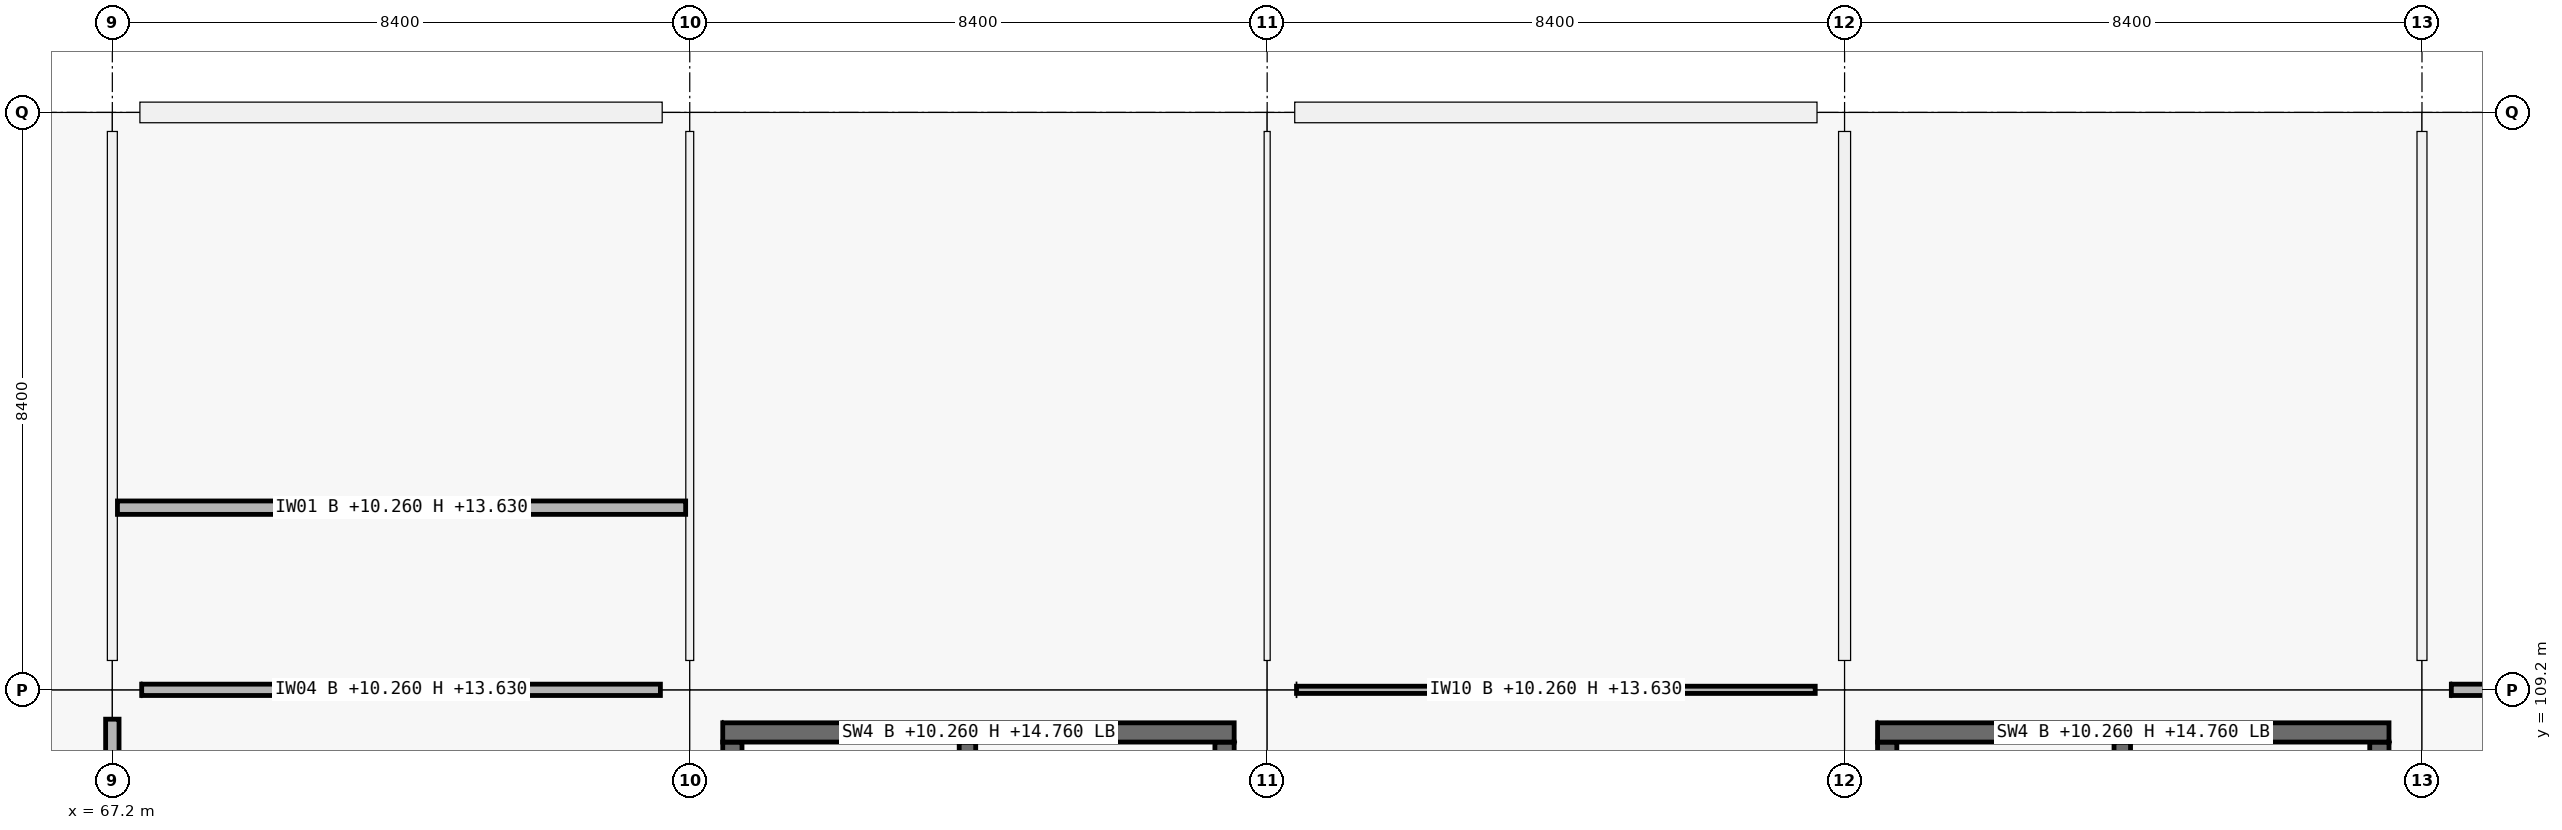
"""IFC4 building model, lengths in metres.
Left out: names, types, materials, properties, quantities, classifications, styles, units other than length and angle.
Written with IfcOpenShell. Run it as: python <this file> out.ifc"""

import sys

from ifc_helpers import new_model, si_unit, direction, frame, frame_2d, origin, origin_2d, place, context, subcontext, project, spatial, rectangle, extrude, element, fill, save


model = new_model("IFC4")
c1 = context("Model", 3, precision=1e-05, world=origin(), true_north=direction((0.0, 1.0)))
c2 = subcontext(c1, "Body", "Model", "MODEL_VIEW")
j1 = project(units=[si_unit("LENGTHUNIT", "METRE"), si_unit("PLANEANGLEUNIT", "RADIAN")], contexts=[c1])
p1 = place(None, origin())
s1 = spatial("IfcSite", under=j1, at=p1, CompositionType="ELEMENT")
p2 = place(p1, origin())
s2 = spatial("IfcBuilding", under=s1, at=p2, CompositionType="ELEMENT")
p3 = place(p2, frame((0.0, 0.0, 10.26)))
s3 = spatial("IfcBuildingStorey", under=s2, at=p3, CompositionType="ELEMENT", Elevation=10.26)
p4 = place(p3, frame((67.2, 109.2, 0.0), z_axis=(0.0, 0.0, 1.0), x_axis=(1.0, 0.0, 0.0)))
e1 = element("IfcColumn", 1, at=p4, inside=s3, PredefinedType="COLUMN", context=c2, shape_type="SweptSolid", body=[
    extrude(rectangle(XDim=0.85, YDim=0.85, at=origin_2d()), origin(), (0.0, 0.0, 1.0), 4.5),
])
p5 = place(p3, frame((67.2, 117.6, 0.0), z_axis=(0.0, 0.0, 1.0), x_axis=(1.0, 0.0, 0.0)))
e2 = element("IfcColumn", 2, at=p5, inside=s3, PredefinedType="COLUMN", context=c2, shape_type="SweptSolid", body=[
    extrude(rectangle(XDim=0.8, YDim=0.55, at=origin_2d()), origin(), (0.0, 0.0, 1.0), 4.5),
])
p6 = place(p3, frame((75.6, 109.2, 0.0), z_axis=(0.0, 0.0, 1.0), x_axis=(1.0, 0.0, 0.0)))
e3 = element("IfcColumn", 3, at=p6, inside=s3, PredefinedType="COLUMN", context=c2, shape_type="SweptSolid", body=[
    extrude(rectangle(XDim=0.85, YDim=0.85, at=origin_2d()), origin(), (0.0, 0.0, 1.0), 4.5),
])
p7 = place(p3, frame((75.6, 117.6, 0.0), z_axis=(0.0, 0.0, 1.0), x_axis=(1.0, 0.0, 0.0)))
e4 = element("IfcColumn", 4, at=p7, inside=s3, PredefinedType="COLUMN", context=c2, shape_type="SweptSolid", body=[
    extrude(rectangle(XDim=0.8, YDim=0.55, at=origin_2d()), origin(), (0.0, 0.0, 1.0), 4.5),
])
p8 = place(p3, frame((84.0, 109.2, 0.0), z_axis=(0.0, 0.0, 1.0), x_axis=(1.0, 0.0, 0.0)))
e5 = element("IfcColumn", 5, at=p8, inside=s3, PredefinedType="COLUMN", context=c2, shape_type="SweptSolid", body=[
    extrude(rectangle(XDim=0.85, YDim=0.85, at=origin_2d()), origin(), (0.0, 0.0, 1.0), 4.5),
])
p9 = place(p3, frame((84.0, 117.6, 0.0), z_axis=(0.0, 0.0, 1.0), x_axis=(1.0, 0.0, 0.0)))
e6 = element("IfcColumn", 6, at=p9, inside=s3, PredefinedType="COLUMN", context=c2, shape_type="SweptSolid", body=[
    extrude(rectangle(XDim=0.8, YDim=0.55, at=origin_2d()), origin(), (0.0, 0.0, 1.0), 4.5),
])
p10 = place(p3, frame((92.4, 109.2, 0.0), z_axis=(0.0, 0.0, 1.0), x_axis=(1.0, 0.0, 0.0)))
e7 = element("IfcColumn", 7, at=p10, inside=s3, PredefinedType="COLUMN", context=c2, shape_type="SweptSolid", body=[
    extrude(rectangle(XDim=0.85, YDim=0.85, at=origin_2d()), origin(), (0.0, 0.0, 1.0), 4.5),
])
p11 = place(p3, frame((92.4, 117.6, 0.0), z_axis=(0.0, 0.0, 1.0), x_axis=(1.0, 0.0, 0.0)))
e8 = element("IfcColumn", 8, at=p11, inside=s3, PredefinedType="COLUMN", context=c2, shape_type="SweptSolid", body=[
    extrude(rectangle(XDim=0.8, YDim=0.55, at=origin_2d()), origin(), (0.0, 0.0, 1.0), 4.5),
])
p12 = place(p3, frame((100.8, 109.2, 0.0), z_axis=(0.0, 0.0, 1.0), x_axis=(1.0, 0.0, 0.0)))
e9 = element("IfcColumn", 9, at=p12, inside=s3, PredefinedType="COLUMN", context=c2, shape_type="SweptSolid", body=[
    extrude(rectangle(XDim=0.85, YDim=0.85, at=origin_2d()), origin(), (0.0, 0.0, 1.0), 4.5),
])
p13 = place(p3, frame((100.8, 117.6, 0.0), z_axis=(0.0, 0.0, 1.0), x_axis=(1.0, 0.0, 0.0)))
e10 = element("IfcColumn", 10, at=p13, inside=s3, PredefinedType="COLUMN", context=c2, shape_type="SweptSolid", body=[
    extrude(rectangle(XDim=0.8, YDim=0.55, at=origin_2d()), origin(), (0.0, 0.0, 1.0), 4.5),
])
p14 = place(p3, frame((67.601, 117.6, 0.0), z_axis=(0.0, 0.0, 1.0), x_axis=(1.0, 0.0, 0.0)))
e11 = element("IfcWall", 11, at=p14, inside=s3, PredefinedType="SOLIDWALL", context=c2, shape_type="SweptSolid", body=[
    extrude(rectangle(XDim=7.598, YDim=0.3, at=frame_2d((3.799, 0.0))), origin(), (0.0, 0.0, 1.0), 3.54),
])
p15 = place(p14, frame((3.124, 0.0, 0.9)))
e12 = element("IfcOpeningElement", 12, at=p15, cuts=e11, PredefinedType="OPENING", context=c2, shape_type="SweptSolid", body=[
    extrude(rectangle(XDim=1.35, YDim=1.5, at=frame_2d((0.675, 0.75))), frame((0.0, 0.15, 0.0), z_axis=(0.0, -1.0, 0.0), x_axis=(1.0, 0.0, 0.0)), (0.0, 0.0, 1.0), 0.3),
])
p16 = place(p3, frame((84.401, 117.6, 0.0), z_axis=(0.0, 0.0, 1.0), x_axis=(1.0, 0.0, 0.0)))
e13 = element("IfcWall", 13, at=p16, inside=s3, PredefinedType="SOLIDWALL", context=c2, shape_type="SweptSolid", body=[
    extrude(rectangle(XDim=7.598, YDim=0.3, at=frame_2d((3.799, 0.0))), origin(), (0.0, 0.0, 1.0), 3.54),
])
p17 = place(p16, frame((2.949, 0.0, 0.9)))
e14 = element("IfcOpeningElement", 14, at=p17, cuts=e13, PredefinedType="OPENING", context=c2, shape_type="SweptSolid", body=[
    extrude(rectangle(XDim=1.7, YDim=1.85, at=frame_2d((0.85, 0.925))), frame((0.0, 0.15, 0.0), z_axis=(0.0, -1.0, 0.0), x_axis=(1.0, 0.0, 0.0)), (0.0, 0.0, 1.0), 0.3),
])
p18 = place(p3, frame((76.22, 101.56, 0.0), z_axis=(0.0, 0.0, 1.0), x_axis=(0.0, 1.0, 0.0)))
e15 = element("IfcWall", 15, at=p18, inside=s3, PredefinedType="SHEAR", context=c2, shape_type="SweptSolid", body=[
    extrude(rectangle(XDim=6.88, YDim=0.28, at=frame_2d((3.44, 0.0))), origin(), (0.0, 0.0, 1.0), 4.5),
])
p19 = place(p3, frame((76.08, 108.58, 0.0), z_axis=(0.0, 0.0, 1.0), x_axis=(1.0, 0.0, 0.0)))
e16 = element("IfcWall", 16, at=p19, inside=s3, PredefinedType="SHEAR", context=c2, shape_type="SweptSolid", body=[
    extrude(rectangle(XDim=7.44, YDim=0.28, at=frame_2d((3.72, 0.0))), origin(), (0.0, 0.0, 1.0), 4.5),
])
p20 = place(p3, frame((83.38, 108.44, 0.0), z_axis=(0.0, 0.0, 1.0), x_axis=(0.0, -1.0, 0.0)))
e17 = element("IfcWall", 17, at=p20, inside=s3, PredefinedType="SHEAR", context=c2, shape_type="SweptSolid", body=[
    extrude(rectangle(XDim=6.88, YDim=0.28, at=frame_2d((3.44, 0.0))), origin(), (0.0, 0.0, 1.0), 4.5),
])
p21 = place(p20, frame((3.99, 0.0, 0.0)))
e18 = element("IfcOpeningElement", 18, at=p21, cuts=e17, PredefinedType="OPENING", context=c2, shape_type="SweptSolid", body=[
    extrude(rectangle(XDim=1.5, YDim=2.15, at=frame_2d((0.75, 1.075))), frame((0.0, 0.14, 0.0), z_axis=(0.0, -1.0, 0.0), x_axis=(1.0, 0.0, 0.0)), (0.0, 0.0, 1.0), 0.28),
])
p22 = place(p3, frame((79.64, 101.56, 0.0), z_axis=(0.0, 0.0, 1.0), x_axis=(0.0, 1.0, 0.0)))
e19 = element("IfcWall", 19, at=p22, inside=s3, PredefinedType="SHEAR", context=c2, shape_type="SweptSolid", body=[
    extrude(rectangle(XDim=6.88, YDim=0.24, at=frame_2d((3.44, 0.0))), origin(), (0.0, 0.0, 1.0), 4.5),
])
p23 = place(p22, frame((0.12, 0.0, 0.0)))
e20 = element("IfcOpeningElement", 20, at=p23, cuts=e19, PredefinedType="OPENING", context=c2, shape_type="SweptSolid", body=[
    extrude(rectangle(XDim=1.0, YDim=2.15, at=frame_2d((0.5, 1.075))), frame((0.0, 0.12, 0.0), z_axis=(0.0, -1.0, 0.0), x_axis=(1.0, 0.0, 0.0)), (0.0, 0.0, 1.0), 0.24),
])
p24 = place(p3, frame((93.02, 101.56, 0.0), z_axis=(0.0, 0.0, 1.0), x_axis=(0.0, 1.0, 0.0)))
e21 = element("IfcWall", 21, at=p24, inside=s3, PredefinedType="SHEAR", context=c2, shape_type="SweptSolid", body=[
    extrude(rectangle(XDim=6.88, YDim=0.28, at=frame_2d((3.44, 0.0))), origin(), (0.0, 0.0, 1.0), 4.5),
])
p25 = place(p3, frame((92.88, 108.58, 0.0), z_axis=(0.0, 0.0, 1.0), x_axis=(1.0, 0.0, 0.0)))
e22 = element("IfcWall", 22, at=p25, inside=s3, PredefinedType="SHEAR", context=c2, shape_type="SweptSolid", body=[
    extrude(rectangle(XDim=7.44, YDim=0.28, at=frame_2d((3.72, 0.0))), origin(), (0.0, 0.0, 1.0), 4.5),
])
p26 = place(p3, frame((100.18, 108.44, 0.0), z_axis=(0.0, 0.0, 1.0), x_axis=(0.0, -1.0, 0.0)))
e23 = element("IfcWall", 23, at=p26, inside=s3, PredefinedType="SHEAR", context=c2, shape_type="SweptSolid", body=[
    extrude(rectangle(XDim=6.88, YDim=0.28, at=frame_2d((3.44, 0.0))), origin(), (0.0, 0.0, 1.0), 4.5),
])
p27 = place(p26, frame((3.99, 0.0, 0.0)))
e24 = element("IfcOpeningElement", 24, at=p27, cuts=e23, PredefinedType="OPENING", context=c2, shape_type="SweptSolid", body=[
    extrude(rectangle(XDim=1.5, YDim=2.15, at=frame_2d((0.75, 1.075))), frame((0.0, 0.14, 0.0), z_axis=(0.0, -1.0, 0.0), x_axis=(1.0, 0.0, 0.0)), (0.0, 0.0, 1.0), 0.28),
])
p28 = place(p3, frame((96.44, 101.56, 0.0), z_axis=(0.0, 0.0, 1.0), x_axis=(0.0, 1.0, 0.0)))
e25 = element("IfcWall", 25, at=p28, inside=s3, PredefinedType="SHEAR", context=c2, shape_type="SweptSolid", body=[
    extrude(rectangle(XDim=6.88, YDim=0.24, at=frame_2d((3.44, 0.0))), origin(), (0.0, 0.0, 1.0), 4.5),
])
p29 = place(p28, frame((0.12, 0.0, 0.0)))
e26 = element("IfcOpeningElement", 26, at=p29, cuts=e25, PredefinedType="OPENING", context=c2, shape_type="SweptSolid", body=[
    extrude(rectangle(XDim=1.0, YDim=2.15, at=frame_2d((0.5, 1.075))), frame((0.0, 0.12, 0.0), z_axis=(0.0, -1.0, 0.0), x_axis=(1.0, 0.0, 0.0)), (0.0, 0.0, 1.0), 0.24),
])
p30 = place(p3, frame((67.627, 109.2, 0.0), z_axis=(0.0, 0.0, 1.0), x_axis=(1.0, 0.0, 0.0)))
e27 = element("IfcWall", 27, at=p30, inside=s3, PredefinedType="PARTITIONING", context=c2, shape_type="SweptSolid", body=[
    extrude(rectangle(XDim=7.546, YDim=0.165, at=frame_2d((3.773, 0.0))), origin(), (0.0, 0.0, 1.0), 3.37),
])
p31 = place(p3, frame((84.427, 109.2, 0.0), z_axis=(0.0, 0.0, 1.0), x_axis=(1.0, 0.0, 0.0)))
e28 = element("IfcWall", 28, at=p31, inside=s3, PredefinedType="PARTITIONING", context=c2, shape_type="SweptSolid", body=[
    extrude(rectangle(XDim=7.546, YDim=0.105, at=frame_2d((3.773, 0.0))), origin(), (0.0, 0.0, 1.0), 3.37),
])
p32 = place(p31, frame((3.288, 0.0, 0.0)))
e29 = element("IfcOpeningElement", 29, at=p32, cuts=e28, PredefinedType="OPENING", context=c2, shape_type="SweptSolid", body=[
    extrude(rectangle(XDim=0.97, YDim=2.12, at=frame_2d((0.485, 1.06))), frame((0.0, 0.052, 0.0), z_axis=(0.0, -1.0, 0.0), x_axis=(1.0, 0.0, 0.0)), (0.0, 0.0, 1.0), 0.105),
])
p33 = place(p3, frame((101.227, 109.2, 0.0), z_axis=(0.0, 0.0, 1.0), x_axis=(1.0, 0.0, 0.0)))
e30 = element("IfcWall", 30, at=p33, inside=s3, PredefinedType="PARTITIONING", context=c2, shape_type="SweptSolid", body=[
    extrude(rectangle(XDim=7.546, YDim=0.165, at=frame_2d((3.773, 0.0))), origin(), (0.0, 0.0, 1.0), 3.37),
])
p34 = place(p33, frame((3.273, 0.0, 0.0)))
e31 = element("IfcOpeningElement", 31, at=p34, cuts=e30, PredefinedType="OPENING", context=c2, shape_type="SweptSolid", body=[
    extrude(rectangle(XDim=1.0, YDim=2.2, at=frame_2d((0.5, 1.1))), frame((0.0, 0.083, 0.0), z_axis=(0.0, -1.0, 0.0), x_axis=(1.0, 0.0, 0.0)), (0.0, 0.0, 1.0), 0.165),
])
p35 = place(p3, frame((67.2, 101.227, 0.0), z_axis=(0.0, 0.0, 1.0), x_axis=(0.0, 1.0, 0.0)))
e32 = element("IfcWall", 32, at=p35, inside=s3, PredefinedType="PARTITIONING", context=c2, shape_type="SweptSolid", body=[
    extrude(rectangle(XDim=7.546, YDim=0.195, at=frame_2d((3.773, 0.0))), origin(), (0.0, 0.0, 1.0), 3.37),
])
p36 = place(p35, frame((3.273, 0.0, 0.0)))
e33 = element("IfcOpeningElement", 33, at=p36, cuts=e32, PredefinedType="OPENING", context=c2, shape_type="SweptSolid", body=[
    extrude(rectangle(XDim=1.0, YDim=2.2, at=frame_2d((0.5, 1.1))), frame((0.0, 0.098, 0.0), z_axis=(0.0, -1.0, 0.0), x_axis=(1.0, 0.0, 0.0)), (0.0, 0.0, 1.0), 0.195),
])
p37 = place(p3, frame((67.2, 109.627, 0.0), z_axis=(0.0, 0.0, 1.0), x_axis=(0.0, 1.0, 0.0)))
e34 = element("IfcWall", 34, at=p37, inside=s3, PredefinedType="PARTITIONING", context=c2, shape_type="SweptSolid", body=[
    extrude(rectangle(XDim=7.696, YDim=0.145, at=frame_2d((3.848, 0.0))), origin(), (0.0, 0.0, 1.0), 3.37),
])
p38 = place(p37, frame((0.558, 0.0, 0.0)))
e35 = element("IfcOpeningElement", 35, at=p38, cuts=e34, PredefinedType="OPENING", context=c2, shape_type="SweptSolid", body=[
    extrude(rectangle(XDim=0.96, YDim=2.1, at=frame_2d((0.48, 1.05))), frame((0.0, 0.073, 0.0), z_axis=(0.0, -1.0, 0.0), x_axis=(1.0, 0.0, 0.0)), (0.0, 0.0, 1.0), 0.145),
])
p39 = place(p37, frame((4.498, 0.0, 0.0)))
e36 = element("IfcOpeningElement", 36, at=p39, cuts=e34, PredefinedType="OPENING", context=c2, shape_type="SweptSolid", body=[
    extrude(rectangle(XDim=0.92, YDim=2.1, at=frame_2d((0.46, 1.05))), frame((0.0, 0.073, 0.0), z_axis=(0.0, -1.0, 0.0), x_axis=(1.0, 0.0, 0.0)), (0.0, 0.0, 1.0), 0.145),
])
p40 = place(p3, frame((75.6, 109.627, 0.0), z_axis=(0.0, 0.0, 1.0), x_axis=(0.0, 1.0, 0.0)))
e37 = element("IfcWall", 37, at=p40, inside=s3, PredefinedType="PARTITIONING", context=c2, shape_type="SweptSolid", body=[
    extrude(rectangle(XDim=7.696, YDim=0.115, at=frame_2d((3.848, 0.0))), origin(), (0.0, 0.0, 1.0), 3.37),
])
p41 = place(p3, frame((84.0, 109.627, 0.0), z_axis=(0.0, 0.0, 1.0), x_axis=(0.0, 1.0, 0.0)))
e38 = element("IfcWall", 38, at=p41, inside=s3, PredefinedType="PARTITIONING", context=c2, shape_type="SweptSolid", body=[
    extrude(rectangle(XDim=7.696, YDim=0.088, at=frame_2d((3.848, 0.0))), origin(), (0.0, 0.0, 1.0), 3.37),
])
p42 = place(p41, frame((3.343, 0.0, 0.0)))
e39 = element("IfcOpeningElement", 39, at=p42, cuts=e38, PredefinedType="OPENING", context=c2, shape_type="SweptSolid", body=[
    extrude(rectangle(XDim=1.01, YDim=2.12, at=frame_2d((0.505, 1.06))), frame((0.0, 0.044, 0.0), z_axis=(0.0, -1.0, 0.0), x_axis=(1.0, 0.0, 0.0)), (0.0, 0.0, 1.0), 0.088),
])
p43 = place(p3, frame((92.4, 109.627, 0.0), z_axis=(0.0, 0.0, 1.0), x_axis=(0.0, 1.0, 0.0)))
e40 = element("IfcWall", 40, at=p43, inside=s3, PredefinedType="PARTITIONING", context=c2, shape_type="SweptSolid", body=[
    extrude(rectangle(XDim=7.696, YDim=0.175, at=frame_2d((3.848, 0.0))), origin(), (0.0, 0.0, 1.0), 3.37),
])
p44 = place(p43, frame((3.363, 0.0, 0.0)))
e41 = element("IfcOpeningElement", 41, at=p44, cuts=e40, PredefinedType="OPENING", context=c2, shape_type="SweptSolid", body=[
    extrude(rectangle(XDim=0.97, YDim=2.12, at=frame_2d((0.485, 1.06))), frame((0.0, 0.087, 0.0), z_axis=(0.0, -1.0, 0.0), x_axis=(1.0, 0.0, 0.0)), (0.0, 0.0, 1.0), 0.175),
])
p45 = place(p3, frame((100.8, 109.627, 0.0), z_axis=(0.0, 0.0, 1.0), x_axis=(0.0, 1.0, 0.0)))
e42 = element("IfcWall", 42, at=p45, inside=s3, PredefinedType="PARTITIONING", context=c2, shape_type="SweptSolid", body=[
    extrude(rectangle(XDim=7.696, YDim=0.145, at=frame_2d((3.848, 0.0))), origin(), (0.0, 0.0, 1.0), 3.37),
])
p46 = place(p45, frame((3.388, 0.0, 0.0)))
e43 = element("IfcOpeningElement", 43, at=p46, cuts=e42, PredefinedType="OPENING", context=c2, shape_type="SweptSolid", body=[
    extrude(rectangle(XDim=0.92, YDim=2.15, at=frame_2d((0.46, 1.075))), frame((0.0, 0.073, 0.0), z_axis=(0.0, -1.0, 0.0), x_axis=(1.0, 0.0, 0.0)), (0.0, 0.0, 1.0), 0.145),
])
p47 = place(p3, frame((67.274, 111.85, 0.0), z_axis=(0.0, 0.0, 1.0), x_axis=(1.0, 0.0, 0.0)))
e44 = element("IfcWall", 44, at=p47, inside=s3, PredefinedType="PARTITIONING", context=c2, shape_type="SweptSolid", body=[
    extrude(rectangle(XDim=8.266, YDim=0.195, at=frame_2d((4.133, 0.0))), origin(), (0.0, 0.0, 1.0), 3.37),
])
p48 = place(p15, origin())
e45 = element("IfcWindow", 45, at=p48, inside=s3, PartitioningType="SINGLE_PANEL", PredefinedType="WINDOW", context=c2, shape_type="SweptSolid", body=[
    extrude(rectangle(XDim=1.35, YDim=1.5, at=frame_2d((0.675, 0.75))), frame((0.0, 0.03, 0.0), z_axis=(0.0, -1.0, 0.0), x_axis=(1.0, 0.0, 0.0)), (0.0, 0.0, 1.0), 0.06),
])
fill(e12, e45)
p49 = place(p17, origin())
e46 = element("IfcWindow", 46, at=p49, inside=s3, PartitioningType="SINGLE_PANEL", PredefinedType="WINDOW", context=c2, shape_type="SweptSolid", body=[
    extrude(rectangle(XDim=1.7, YDim=1.85, at=frame_2d((0.85, 0.925))), frame((0.0, 0.03, 0.0), z_axis=(0.0, -1.0, 0.0), x_axis=(1.0, 0.0, 0.0)), (0.0, 0.0, 1.0), 0.06),
])
fill(e14, e46)
p50 = place(p38, origin())
e47 = element("IfcDoor", 47, at=p50, inside=s3, OperationType="SINGLE_SWING_RIGHT", PredefinedType="DOOR", context=c2, shape_type="SweptSolid", body=[
    extrude(rectangle(XDim=0.96, YDim=2.1, at=frame_2d((0.48, 1.05))), frame((0.0, 0.025, 0.0), z_axis=(0.0, -1.0, 0.0), x_axis=(1.0, 0.0, 0.0)), (0.0, 0.0, 1.0), 0.05),
])
fill(e35, e47)
p51 = place(p39, origin())
e48 = element("IfcDoor", 48, at=p51, inside=s3, OperationType="SINGLE_SWING_LEFT", PredefinedType="DOOR", context=c2, shape_type="SweptSolid", body=[
    extrude(rectangle(XDim=0.92, YDim=2.1, at=frame_2d((0.46, 1.05))), frame((0.0, 0.025, 0.0), z_axis=(0.0, -1.0, 0.0), x_axis=(1.0, 0.0, 0.0)), (0.0, 0.0, 1.0), 0.05),
])
fill(e36, e48)
p52 = place(p32, origin())
e49 = element("IfcDoor", 49, at=p52, inside=s3, OperationType="SINGLE_SWING_LEFT", PredefinedType="DOOR", context=c2, shape_type="SweptSolid", body=[
    extrude(rectangle(XDim=0.97, YDim=2.12, at=frame_2d((0.485, 1.06))), frame((0.0, 0.025, 0.0), z_axis=(0.0, -1.0, 0.0), x_axis=(1.0, 0.0, 0.0)), (0.0, 0.0, 1.0), 0.05),
])
fill(e29, e49)
p53 = place(p42, origin())
e50 = element("IfcDoor", 50, at=p53, inside=s3, OperationType="SINGLE_SWING_RIGHT", PredefinedType="DOOR", context=c2, shape_type="SweptSolid", body=[
    extrude(rectangle(XDim=1.01, YDim=2.12, at=frame_2d((0.505, 1.06))), frame((0.0, 0.025, 0.0), z_axis=(0.0, -1.0, 0.0), x_axis=(1.0, 0.0, 0.0)), (0.0, 0.0, 1.0), 0.05),
])
fill(e39, e50)
p54 = place(p44, origin())
e51 = element("IfcDoor", 51, at=p54, inside=s3, OperationType="SINGLE_SWING_LEFT", PredefinedType="DOOR", context=c2, shape_type="SweptSolid", body=[
    extrude(rectangle(XDim=0.97, YDim=2.12, at=frame_2d((0.485, 1.06))), frame((0.0, 0.025, 0.0), z_axis=(0.0, -1.0, 0.0), x_axis=(1.0, 0.0, 0.0)), (0.0, 0.0, 1.0), 0.05),
])
fill(e41, e51)
p55 = place(p46, origin())
e52 = element("IfcDoor", 52, at=p55, inside=s3, OperationType="SINGLE_SWING_RIGHT", PredefinedType="DOOR", context=c2, shape_type="SweptSolid", body=[
    extrude(rectangle(XDim=0.92, YDim=2.15, at=frame_2d((0.46, 1.075))), frame((0.0, 0.025, 0.0), z_axis=(0.0, -1.0, 0.0), x_axis=(1.0, 0.0, 0.0)), (0.0, 0.0, 1.0), 0.05),
])
fill(e43, e52)
save(model, sys.argv[1])
